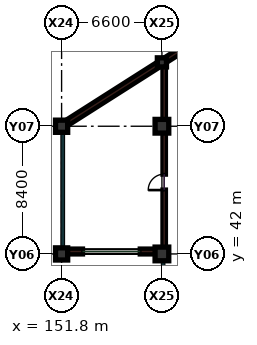
"""IFC4 building model, lengths in metres.
Left out: names, types, materials, properties, quantities, classifications, styles, units other than length and angle.
Written with IfcOpenShell. Run it as: python <this file> out.ifc"""

import sys

from ifc_helpers import new_model, si_unit, direction, frame, frame_2d, origin, origin_2d, place, context, subcontext, project, spatial, rectangle, extrude, element, fill, save


model = new_model("IFC4")
c1 = context("Model", 3, precision=1e-05, world=origin(), true_north=direction((0.0, 1.0)))
c2 = subcontext(c1, "Body", "Model", "MODEL_VIEW")
j1 = project(units=[si_unit("LENGTHUNIT", "METRE"), si_unit("PLANEANGLEUNIT", "RADIAN")], contexts=[c1])
p1 = place(None, origin())
s1 = spatial("IfcSite", under=j1, at=p1, CompositionType="ELEMENT")
p2 = place(p1, origin())
s2 = spatial("IfcBuilding", under=s1, at=p2, CompositionType="ELEMENT")
p3 = place(p2, frame((0.0, 0.0, 9.9)))
s3 = spatial("IfcBuildingStorey", under=s2, at=p3, CompositionType="ELEMENT", Elevation=9.9)
for number, where, z_axis, x_axis in (
    (1, (151.8, 42.0, 0.0), (0.0, 0.0, 1.0), (1.0, 0.0, 0.0)),
    (2, (151.8, 50.4, 0.0), (0.0, 0.0, 1.0), (1.0, 0.0, 0.0)),
):
    element("IfcColumn", number, at=place(p3, frame(where, z_axis=z_axis, x_axis=x_axis)), inside=s3, PredefinedType="COLUMN", context=c2, shape_type="SweptSolid", body=[
        extrude(rectangle(XDim=0.8, YDim=0.8, at=origin_2d()), origin(), (0.0, 0.0, 1.0), 4.5),
    ])
for number, where, z_axis, x_axis in (
    (3, (158.4, 42.0, 0.0), (0.0, 0.0, 1.0), (1.0, 0.0, 0.0)),
    (4, (158.4, 50.4, 0.0), (0.0, 0.0, 1.0), (1.0, 0.0, 0.0)),
):
    element("IfcColumn", number, at=place(p3, frame(where, z_axis=z_axis, x_axis=x_axis)), inside=s3, PredefinedType="COLUMN", context=c2, shape_type="SweptSolid", body=[
        extrude(rectangle(XDim=0.9, YDim=0.9, at=origin_2d()), origin(), (0.0, 0.0, 1.0), 4.5),
    ])
p4 = place(p3, frame((158.4, 54.6, 0.0), z_axis=(0.0, 0.0, 1.0), x_axis=(1.0, 0.0, 0.0)))
e5 = element("IfcColumn", 5, at=p4, inside=s3, PredefinedType="COLUMN", context=c2, shape_type="SweptSolid", body=[
    extrude(rectangle(XDim=0.6, YDim=0.6, at=origin_2d()), origin(), (0.0, 0.0, 1.0), 4.5),
])
p5 = place(p3, frame((158.55, 42.0, 0.0), z_axis=(0.0, 0.0, 1.0), x_axis=(0.0, 1.0, 0.0)))
e6 = element("IfcWall", 6, at=p5, inside=s3, PredefinedType="PARTITIONING", context=c2, shape_type="SweptSolid", body=[
    extrude(rectangle(XDim=7.95, YDim=0.16, at=frame_2d((3.975, 0.0))), origin(), (0.0, 0.0, 1.0), 3.49),
])
p6 = place(p5, frame((4.2, 0.0, 0.0)))
e7 = element("IfcOpeningElement", 7, at=p6, cuts=e6, PredefinedType="OPENING", context=c2, shape_type="SweptSolid", body=[
    extrude(rectangle(XDim=1.05, YDim=2.15, at=frame_2d((0.525, 1.075))), frame((0.0, 0.09, 0.0), z_axis=(0.0, -1.0, 0.0), x_axis=(1.0, 0.0, 0.0)), (0.0, 0.0, 1.0), 0.18),
])
p7 = place(p3, frame((158.55, 50.85, 0.0), z_axis=(0.0, 0.0, 1.0), x_axis=(0.0, 1.0, 0.0)))
e8 = element("IfcWall", 8, at=p7, inside=s3, PredefinedType="PARTITIONING", context=c2, shape_type="SweptSolid", body=[
    extrude(rectangle(XDim=3.8, YDim=0.16, at=frame_2d((1.9, 0.0))), origin(), (0.0, 0.0, 1.0), 3.49),
])
p8 = place(p3, frame((152.195, 42.16, 0.0), z_axis=(0.0, 0.0, 1.0), x_axis=(1.0, 0.0, 0.0)))
e9 = element("IfcWall", 9, at=p8, inside=s3, PredefinedType="SOLIDWALL", context=c2, shape_type="SweptSolid", body=[
    extrude(rectangle(XDim=5.76, YDim=0.32, at=frame_2d((2.88, 0.0))), origin(), (0.0, 0.0, 1.0), 3.625),
])
p9 = place(p8, frame((0.98, 0.0, 1.35)))
e10 = element("IfcOpeningElement", 10, at=p9, cuts=e9, PredefinedType="OPENING", context=c2, shape_type="SweptSolid", body=[
    extrude(rectangle(XDim=3.8, YDim=1.15, at=frame_2d((1.9, 0.575))), frame((0.0, 0.17, 0.0), z_axis=(0.0, -1.0, 0.0), x_axis=(1.0, 0.0, 0.0)), (0.0, 0.0, 1.0), 0.34),
])
p10 = place(p3, frame((152.05, 50.56, 0.0), z_axis=(0.0, 0.0, 1.0), x_axis=(0.843776886751, 0.536694107835, 0.0)))
e11 = element("IfcWall", 11, at=p10, inside=s3, PredefinedType="SHEAR", context=c2, shape_type="SweptSolid", body=[
    extrude(rectangle(XDim=7.229, YDim=0.34, at=frame_2d((3.615, 0.0))), origin(), (0.0, 0.0, 1.0), 4.24),
])
p11 = place(p3, frame((158.65, 54.76, 0.0), z_axis=(0.0, 0.0, 1.0), x_axis=(0.843786613851, 0.536678814829, 0.0)))
e12 = element("IfcWall", 12, at=p11, inside=s3, PredefinedType="SOLIDWALL", context=c2, shape_type="SweptSolid", body=[
    extrude(rectangle(XDim=7.229, YDim=0.32, at=frame_2d((3.615, 0.0))), origin(), (0.0, 0.0, 1.0), 3.625),
])
p12 = place(p11, frame((2.415, 0.0, 0.95)))
e13 = element("IfcOpeningElement", 13, at=p12, cuts=e12, PredefinedType="OPENING", context=c2, shape_type="SweptSolid", body=[
    extrude(rectangle(XDim=2.4, YDim=1.6, at=frame_2d((1.2, 0.8))), frame((0.0, 0.17, 0.0), z_axis=(0.0, -1.0, 0.0), x_axis=(1.0, 0.0, 0.0)), (0.0, 0.0, 1.0), 0.34),
])
p13 = place(p6, origin())
e14 = element("IfcDoor", 14, at=p13, inside=s3, OperationType="SINGLE_SWING_LEFT", PredefinedType="DOOR", context=c2, shape_type="SweptSolid", body=[
    extrude(rectangle(XDim=1.05, YDim=2.15, at=frame_2d((0.525, 1.075))), frame((0.0, 0.025, 0.0), z_axis=(0.0, -1.0, 0.0), x_axis=(1.0, 0.0, 0.0)), (0.0, 0.0, 1.0), 0.05),
])
fill(e7, e14)
p14 = place(p9, origin())
e15 = element("IfcWindow", 15, at=p14, inside=s3, PartitioningType="SINGLE_PANEL", PredefinedType="WINDOW", context=c2, shape_type="SweptSolid", body=[
    extrude(rectangle(XDim=3.8, YDim=1.15, at=frame_2d((1.9, 0.575))), frame((0.0, 0.03, 0.0), z_axis=(0.0, -1.0, 0.0), x_axis=(1.0, 0.0, 0.0)), (0.0, 0.0, 1.0), 0.06),
])
fill(e10, e15)
save(model, sys.argv[1])
